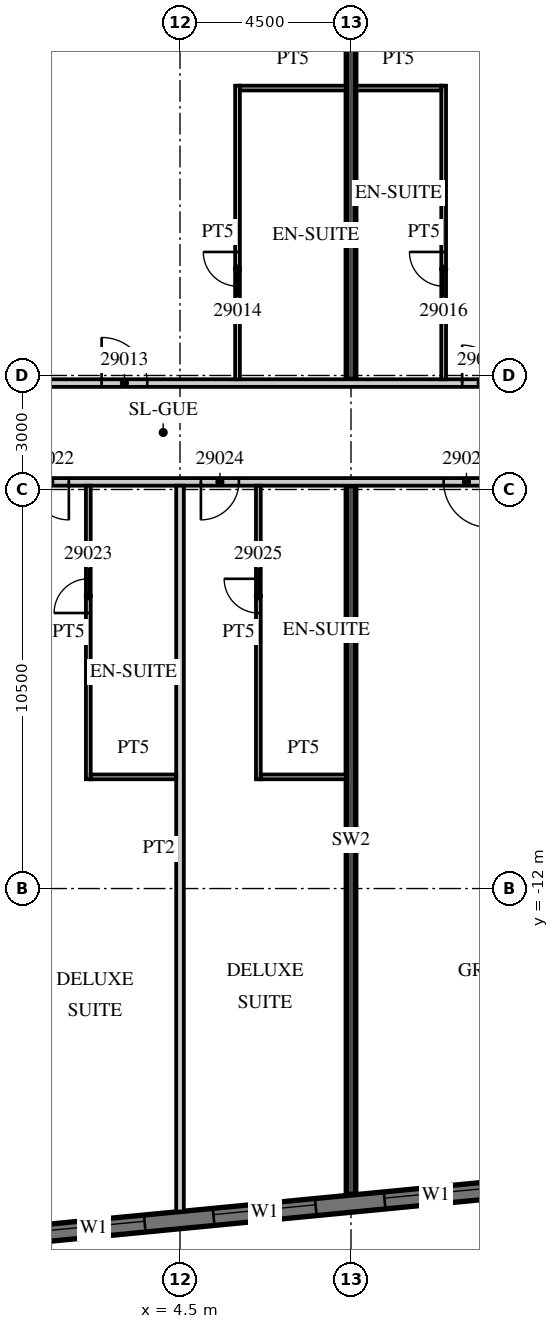
"""IFC4 building model, lengths in metres.
Left out: names, types, materials, properties, quantities, classifications, styles, units other than length and angle.
Written with IfcOpenShell. Run it as: python <this file> out.ifc"""

import sys

from ifc_helpers import new_model, si_unit, direction, frame, frame_2d, origin, place, context, subcontext, project, spatial, rectangle, extrude, element, fill, save


model = new_model("IFC4")
c1 = context("Model", 3, precision=1e-05, world=origin(), true_north=direction((0.0, 1.0)))
c2 = subcontext(c1, "Body", "Model", "MODEL_VIEW")
j1 = project(units=[si_unit("LENGTHUNIT", "METRE"), si_unit("PLANEANGLEUNIT", "RADIAN")], contexts=[c1])
p1 = place(None, origin())
s1 = spatial("IfcSite", under=j1, at=p1, CompositionType="ELEMENT")
p2 = place(p1, origin())
s2 = spatial("IfcBuilding", under=s1, at=p2, CompositionType="ELEMENT")
p3 = place(p2, frame((0.0, 0.0, 130.6)))
s3 = spatial("IfcBuildingStorey", under=s2, at=p3, CompositionType="ELEMENT", Elevation=130.6)
p4 = place(p3, frame((9.0, -20.044, 0.0), z_axis=(0.0, 0.0, 1.0), x_axis=(0.0, 1.0, 0.0)))
e1 = element("IfcWall", 1, at=p4, inside=s3, PredefinedType="SHEAR", context=c2, shape_type="SweptSolid", body=[
    extrude(rectangle(XDim=18.644, YDim=0.25, at=frame_2d((9.322, 0.0))), origin(), (0.0, 0.0, 1.0), 3.3),
])
p5 = place(p3, frame((9.0, 1.4, 0.0), z_axis=(0.0, 0.0, 1.0), x_axis=(0.0, 1.0, 0.0)))
e2 = element("IfcWall", 2, at=p5, inside=s3, PredefinedType="SHEAR", context=c2, shape_type="SweptSolid", body=[
    extrude(rectangle(XDim=20.807, YDim=0.25, at=frame_2d((10.403, 0.0))), origin(), (0.0, 0.0, 1.0), 3.3),
])
p6 = place(p3, frame((-13.521, -22.46, 0.0), z_axis=(0.0, 0.0, 1.0), x_axis=(0.995396096335, 0.095846812164, 0.0)))
e3 = element("IfcWall", 3, at=p6, inside=s3, PredefinedType="SOLIDWALL", context=c2, shape_type="SweptSolid", body=[
    extrude(rectangle(XDim=59.151, YDim=0.45, at=frame_2d((29.575, 0.0))), origin(), (0.0, 0.0, 1.0), 3.02),
])
p7 = place(p6, frame((0.91, 0.0, 0.45)))
e4 = element("IfcOpeningElement", 4, at=p7, cuts=e3, PredefinedType="OPENING", context=c2, shape_type="SweptSolid", body=[
    extrude(rectangle(XDim=2.7, YDim=2.25, at=frame_2d((1.35, 1.125))), frame((0.0, 0.235, 0.0), z_axis=(0.0, -1.0, 0.0), x_axis=(1.0, 0.0, 0.0)), (0.0, 0.0, 1.0), 0.47),
])
p8 = place(p6, frame((5.431, 0.0, 0.45)))
e5 = element("IfcOpeningElement", 5, at=p8, cuts=e3, PredefinedType="OPENING", context=c2, shape_type="SweptSolid", body=[
    extrude(rectangle(XDim=2.7, YDim=2.25, at=frame_2d((1.35, 1.125))), frame((0.0, 0.235, 0.0), z_axis=(0.0, -1.0, 0.0), x_axis=(1.0, 0.0, 0.0)), (0.0, 0.0, 1.0), 0.47),
])
p9 = place(p6, frame((9.952, 0.0, 0.45)))
e6 = element("IfcOpeningElement", 6, at=p9, cuts=e3, PredefinedType="OPENING", context=c2, shape_type="SweptSolid", body=[
    extrude(rectangle(XDim=2.7, YDim=2.25, at=frame_2d((1.35, 1.125))), frame((0.0, 0.235, 0.0), z_axis=(0.0, -1.0, 0.0), x_axis=(1.0, 0.0, 0.0)), (0.0, 0.0, 1.0), 0.47),
])
p10 = place(p6, frame((14.473, 0.0, 0.45)))
e7 = element("IfcOpeningElement", 7, at=p10, cuts=e3, PredefinedType="OPENING", context=c2, shape_type="SweptSolid", body=[
    extrude(rectangle(XDim=2.7, YDim=2.25, at=frame_2d((1.35, 1.125))), frame((0.0, 0.235, 0.0), z_axis=(0.0, -1.0, 0.0), x_axis=(1.0, 0.0, 0.0)), (0.0, 0.0, 1.0), 0.47),
])
p11 = place(p6, frame((18.994, 0.0, 0.45)))
e8 = element("IfcOpeningElement", 8, at=p11, cuts=e3, PredefinedType="OPENING", context=c2, shape_type="SweptSolid", body=[
    extrude(rectangle(XDim=2.7, YDim=2.25, at=frame_2d((1.35, 1.125))), frame((0.0, 0.235, 0.0), z_axis=(0.0, -1.0, 0.0), x_axis=(1.0, 0.0, 0.0)), (0.0, 0.0, 1.0), 0.47),
])
p12 = place(p6, frame((23.514, 0.0, 0.45)))
e9 = element("IfcOpeningElement", 9, at=p12, cuts=e3, PredefinedType="OPENING", context=c2, shape_type="SweptSolid", body=[
    extrude(rectangle(XDim=2.7, YDim=2.25, at=frame_2d((1.35, 1.125))), frame((0.0, 0.235, 0.0), z_axis=(0.0, -1.0, 0.0), x_axis=(1.0, 0.0, 0.0)), (0.0, 0.0, 1.0), 0.47),
])
p13 = place(p6, frame((28.035, 0.0, 0.45)))
e10 = element("IfcOpeningElement", 10, at=p13, cuts=e3, PredefinedType="OPENING", context=c2, shape_type="SweptSolid", body=[
    extrude(rectangle(XDim=2.7, YDim=2.25, at=frame_2d((1.35, 1.125))), frame((0.0, 0.235, 0.0), z_axis=(0.0, -1.0, 0.0), x_axis=(1.0, 0.0, 0.0)), (0.0, 0.0, 1.0), 0.47),
])
p14 = place(p6, frame((32.556, 0.0, 0.45)))
e11 = element("IfcOpeningElement", 11, at=p14, cuts=e3, PredefinedType="OPENING", context=c2, shape_type="SweptSolid", body=[
    extrude(rectangle(XDim=2.7, YDim=2.25, at=frame_2d((1.35, 1.125))), frame((0.0, 0.235, 0.0), z_axis=(0.0, -1.0, 0.0), x_axis=(1.0, 0.0, 0.0)), (0.0, 0.0, 1.0), 0.47),
])
p15 = place(p6, frame((37.077, 0.0, 0.45)))
e12 = element("IfcOpeningElement", 12, at=p15, cuts=e3, PredefinedType="OPENING", context=c2, shape_type="SweptSolid", body=[
    extrude(rectangle(XDim=2.7, YDim=2.25, at=frame_2d((1.35, 1.125))), frame((0.0, 0.235, 0.0), z_axis=(0.0, -1.0, 0.0), x_axis=(1.0, 0.0, 0.0)), (0.0, 0.0, 1.0), 0.47),
])
p16 = place(p6, frame((41.598, 0.0, 0.45)))
e13 = element("IfcOpeningElement", 13, at=p16, cuts=e3, PredefinedType="OPENING", context=c2, shape_type="SweptSolid", body=[
    extrude(rectangle(XDim=2.7, YDim=2.25, at=frame_2d((1.35, 1.125))), frame((0.0, 0.235, 0.0), z_axis=(0.0, -1.0, 0.0), x_axis=(1.0, 0.0, 0.0)), (0.0, 0.0, 1.0), 0.47),
])
p17 = place(p6, frame((46.118, 0.0, 0.45)))
e14 = element("IfcOpeningElement", 14, at=p17, cuts=e3, PredefinedType="OPENING", context=c2, shape_type="SweptSolid", body=[
    extrude(rectangle(XDim=2.7, YDim=2.25, at=frame_2d((1.35, 1.125))), frame((0.0, 0.235, 0.0), z_axis=(0.0, -1.0, 0.0), x_axis=(1.0, 0.0, 0.0)), (0.0, 0.0, 1.0), 0.47),
])
p18 = place(p6, frame((50.639, 0.0, 0.45)))
e15 = element("IfcOpeningElement", 15, at=p18, cuts=e3, PredefinedType="OPENING", context=c2, shape_type="SweptSolid", body=[
    extrude(rectangle(XDim=2.7, YDim=2.25, at=frame_2d((1.35, 1.125))), frame((0.0, 0.235, 0.0), z_axis=(0.0, -1.0, 0.0), x_axis=(1.0, 0.0, 0.0)), (0.0, 0.0, 1.0), 0.47),
])
p19 = place(p6, frame((55.15, 0.0, 0.45)))
e16 = element("IfcOpeningElement", 16, at=p19, cuts=e3, PredefinedType="OPENING", context=c2, shape_type="SweptSolid", body=[
    extrude(rectangle(XDim=2.7, YDim=2.25, at=frame_2d((1.35, 1.125))), frame((0.0, 0.235, 0.0), z_axis=(0.0, -1.0, 0.0), x_axis=(1.0, 0.0, 0.0)), (0.0, 0.0, 1.0), 0.47),
])
p20 = place(p3, frame((-39.316, 1.3, 0.0), z_axis=(0.0, 0.0, 1.0), x_axis=(1.0, 0.0, 0.0)))
e17 = element("IfcWall", 17, at=p20, inside=s3, PredefinedType="PARTITIONING", context=c2, shape_type="SweptSolid", body=[
    extrude(rectangle(XDim=52.816, YDim=0.2, at=frame_2d((26.408, 0.0))), origin(), (0.0, 0.0, 1.0), 3.02),
])
p21 = place(p20, frame((0.15, 0.0, 0.0)))
e18 = element("IfcOpeningElement", 18, at=p21, cuts=e17, PredefinedType="OPENING", context=c2, shape_type="SweptSolid", body=[
    extrude(rectangle(XDim=0.9, YDim=2.1, at=frame_2d((0.45, 1.05))), frame((0.0, 0.11, 0.0), z_axis=(0.0, -1.0, 0.0), x_axis=(1.0, 0.0, 0.0)), (0.0, 0.0, 1.0), 0.22),
])
p22 = place(p20, frame((8.679, 0.0, 0.0)))
e19 = element("IfcOpeningElement", 19, at=p22, cuts=e17, PredefinedType="OPENING", context=c2, shape_type="SweptSolid", body=[
    extrude(rectangle(XDim=1.2, YDim=2.1, at=frame_2d((0.6, 1.05))), frame((0.0, 0.11, 0.0), z_axis=(0.0, -1.0, 0.0), x_axis=(1.0, 0.0, 0.0)), (0.0, 0.0, 1.0), 0.22),
])
p23 = place(p20, frame((14.754, 0.0, 0.0)))
e20 = element("IfcOpeningElement", 20, at=p23, cuts=e17, PredefinedType="OPENING", context=c2, shape_type="SweptSolid", body=[
    extrude(rectangle(XDim=1.2, YDim=2.1, at=frame_2d((0.6, 1.05))), frame((0.0, 0.11, 0.0), z_axis=(0.0, -1.0, 0.0), x_axis=(1.0, 0.0, 0.0)), (0.0, 0.0, 1.0), 0.22),
])
p24 = place(p20, frame((26.678, 0.0, 0.0)))
e21 = element("IfcOpeningElement", 21, at=p24, cuts=e17, PredefinedType="OPENING", context=c2, shape_type="SweptSolid", body=[
    extrude(rectangle(XDim=1.2, YDim=2.1, at=frame_2d((0.6, 1.05))), frame((0.0, 0.11, 0.0), z_axis=(0.0, -1.0, 0.0), x_axis=(1.0, 0.0, 0.0)), (0.0, 0.0, 1.0), 0.22),
])
p25 = place(p20, frame((33.266, 0.0, 0.0)))
e22 = element("IfcOpeningElement", 22, at=p25, cuts=e17, PredefinedType="OPENING", context=c2, shape_type="SweptSolid", body=[
    extrude(rectangle(XDim=1.0, YDim=2.1, at=frame_2d((0.5, 1.05))), frame((0.0, 0.11, 0.0), z_axis=(0.0, -1.0, 0.0), x_axis=(1.0, 0.0, 0.0)), (0.0, 0.0, 1.0), 0.22),
])
p26 = place(p20, frame((37.741, 0.0, 0.0)))
e23 = element("IfcOpeningElement", 23, at=p26, cuts=e17, PredefinedType="OPENING", context=c2, shape_type="SweptSolid", body=[
    extrude(rectangle(XDim=1.0, YDim=2.1, at=frame_2d((0.5, 1.05))), frame((0.0, 0.11, 0.0), z_axis=(0.0, -1.0, 0.0), x_axis=(1.0, 0.0, 0.0)), (0.0, 0.0, 1.0), 0.22),
])
p27 = place(p20, frame((41.754, 0.0, 0.0)))
e24 = element("IfcOpeningElement", 24, at=p27, cuts=e17, PredefinedType="OPENING", context=c2, shape_type="SweptSolid", body=[
    extrude(rectangle(XDim=1.2, YDim=2.1, at=frame_2d((0.6, 1.05))), frame((0.0, 0.11, 0.0), z_axis=(0.0, -1.0, 0.0), x_axis=(1.0, 0.0, 0.0)), (0.0, 0.0, 1.0), 0.22),
])
p28 = place(p20, frame((51.241, 0.0, 0.0)))
e25 = element("IfcOpeningElement", 25, at=p28, cuts=e17, PredefinedType="OPENING", context=c2, shape_type="SweptSolid", body=[
    extrude(rectangle(XDim=1.0, YDim=2.1, at=frame_2d((0.5, 1.05))), frame((0.0, 0.11, 0.0), z_axis=(0.0, -1.0, 0.0), x_axis=(1.0, 0.0, 0.0)), (0.0, 0.0, 1.0), 0.22),
])
p29 = place(p3, frame((6.013, 1.4, 0.0), z_axis=(0.0, 0.0, 1.0), x_axis=(0.0, 1.0, 0.0)))
e26 = element("IfcWall", 26, at=p29, inside=s3, PredefinedType="PARTITIONING", context=c2, shape_type="SweptSolid", body=[
    extrude(rectangle(XDim=7.725, YDim=0.125, at=frame_2d((3.863, 0.0))), origin(), (0.0, 0.0, 1.0), 3.02),
])
p30 = place(p29, frame((2.45, 0.0, 0.0)))
e27 = element("IfcOpeningElement", 27, at=p30, cuts=e26, PredefinedType="OPENING", context=c2, shape_type="SweptSolid", body=[
    extrude(rectangle(XDim=0.9, YDim=2.1, at=frame_2d((0.45, 1.05))), frame((0.0, 0.073, 0.0), z_axis=(0.0, -1.0, 0.0), x_axis=(1.0, 0.0, 0.0)), (0.0, 0.0, 1.0), 0.145),
])
p31 = place(p3, frame((6.075, 9.062, 0.0), z_axis=(0.0, 0.0, 1.0), x_axis=(1.0, 0.0, 0.0)))
e28 = element("IfcWall", 28, at=p31, inside=s3, PredefinedType="PARTITIONING", context=c2, shape_type="SweptSolid", body=[
    extrude(rectangle(XDim=2.8, YDim=0.125, at=frame_2d((1.4, 0.0))), origin(), (0.0, 0.0, 1.0), 3.02),
])
p32 = place(p3, frame((11.438, 1.4, 0.0), z_axis=(0.0, 0.0, 1.0), x_axis=(0.0, 1.0, 0.0)))
e29 = element("IfcWall", 29, at=p32, inside=s3, PredefinedType="PARTITIONING", context=c2, shape_type="SweptSolid", body=[
    extrude(rectangle(XDim=7.725, YDim=0.125, at=frame_2d((3.863, 0.0))), origin(), (0.0, 0.0, 1.0), 3.02),
])
p33 = place(p32, frame((2.45, 0.0, 0.0)))
e30 = element("IfcOpeningElement", 30, at=p33, cuts=e29, PredefinedType="OPENING", context=c2, shape_type="SweptSolid", body=[
    extrude(rectangle(XDim=0.9, YDim=2.1, at=frame_2d((0.45, 1.05))), frame((0.0, 0.073, 0.0), z_axis=(0.0, -1.0, 0.0), x_axis=(1.0, 0.0, 0.0)), (0.0, 0.0, 1.0), 0.145),
])
p34 = place(p3, frame((9.125, 9.062, 0.0), z_axis=(0.0, 0.0, 1.0), x_axis=(1.0, 0.0, 0.0)))
e31 = element("IfcWall", 31, at=p34, inside=s3, PredefinedType="PARTITIONING", context=c2, shape_type="SweptSolid", body=[
    extrude(rectangle(XDim=2.25, YDim=0.125, at=frame_2d((1.125, 0.0))), origin(), (0.0, 0.0, 1.0), 3.02),
])
p35 = place(p3, frame((-13.5, -1.3, 0.0), z_axis=(0.0, 0.0, 1.0), x_axis=(1.0, 0.0, 0.0)))
e32 = element("IfcWall", 32, at=p35, inside=s3, PredefinedType="PARTITIONING", context=c2, shape_type="SweptSolid", body=[
    extrude(rectangle(XDim=60.932, YDim=0.2, at=frame_2d((30.466, 0.0))), origin(), (0.0, 0.0, 1.0), 3.02),
])
p36 = place(p35, frame((2.925, 0.0, 0.0)))
e33 = element("IfcOpeningElement", 33, at=p36, cuts=e32, PredefinedType="OPENING", context=c2, shape_type="SweptSolid", body=[
    extrude(rectangle(XDim=1.0, YDim=2.1, at=frame_2d((0.5, 1.05))), frame((0.0, 0.11, 0.0), z_axis=(0.0, -1.0, 0.0), x_axis=(1.0, 0.0, 0.0)), (0.0, 0.0, 1.0), 0.22),
])
p37 = place(p35, frame((9.863, 0.0, 0.0)))
e34 = element("IfcOpeningElement", 34, at=p37, cuts=e32, PredefinedType="OPENING", context=c2, shape_type="SweptSolid", body=[
    extrude(rectangle(XDim=1.2, YDim=2.1, at=frame_2d((0.6, 1.05))), frame((0.0, 0.11, 0.0), z_axis=(0.0, -1.0, 0.0), x_axis=(1.0, 0.0, 0.0)), (0.0, 0.0, 1.0), 0.22),
])
p38 = place(p35, frame((14.075, 0.0, 0.0)))
e35 = element("IfcOpeningElement", 35, at=p38, cuts=e32, PredefinedType="OPENING", context=c2, shape_type="SweptSolid", body=[
    extrude(rectangle(XDim=1.0, YDim=2.1, at=frame_2d((0.5, 1.05))), frame((0.0, 0.11, 0.0), z_axis=(0.0, -1.0, 0.0), x_axis=(1.0, 0.0, 0.0)), (0.0, 0.0, 1.0), 0.22),
])
p39 = place(p35, frame((18.55, 0.0, 0.0)))
e36 = element("IfcOpeningElement", 36, at=p39, cuts=e32, PredefinedType="OPENING", context=c2, shape_type="SweptSolid", body=[
    extrude(rectangle(XDim=1.0, YDim=2.1, at=frame_2d((0.5, 1.05))), frame((0.0, 0.11, 0.0), z_axis=(0.0, -1.0, 0.0), x_axis=(1.0, 0.0, 0.0)), (0.0, 0.0, 1.0), 0.22),
])
p40 = place(p35, frame((24.938, 0.0, 0.0)))
e37 = element("IfcOpeningElement", 37, at=p40, cuts=e32, PredefinedType="OPENING", context=c2, shape_type="SweptSolid", body=[
    extrude(rectangle(XDim=1.2, YDim=2.1, at=frame_2d((0.6, 1.05))), frame((0.0, 0.11, 0.0), z_axis=(0.0, -1.0, 0.0), x_axis=(1.0, 0.0, 0.0)), (0.0, 0.0, 1.0), 0.22),
])
p41 = place(p35, frame((36.862, 0.0, 0.0)))
e38 = element("IfcOpeningElement", 38, at=p41, cuts=e32, PredefinedType="OPENING", context=c2, shape_type="SweptSolid", body=[
    extrude(rectangle(XDim=1.2, YDim=2.1, at=frame_2d((0.6, 1.05))), frame((0.0, 0.11, 0.0), z_axis=(0.0, -1.0, 0.0), x_axis=(1.0, 0.0, 0.0)), (0.0, 0.0, 1.0), 0.22),
])
p42 = place(p35, frame((41.075, 0.0, 0.0)))
e39 = element("IfcOpeningElement", 39, at=p42, cuts=e32, PredefinedType="OPENING", context=c2, shape_type="SweptSolid", body=[
    extrude(rectangle(XDim=1.0, YDim=2.1, at=frame_2d((0.5, 1.05))), frame((0.0, 0.11, 0.0), z_axis=(0.0, -1.0, 0.0), x_axis=(1.0, 0.0, 0.0)), (0.0, 0.0, 1.0), 0.22),
])
p43 = place(p35, frame((45.55, 0.0, 0.0)))
e40 = element("IfcOpeningElement", 40, at=p43, cuts=e32, PredefinedType="OPENING", context=c2, shape_type="SweptSolid", body=[
    extrude(rectangle(XDim=1.0, YDim=2.1, at=frame_2d((0.5, 1.05))), frame((0.0, 0.11, 0.0), z_axis=(0.0, -1.0, 0.0), x_axis=(1.0, 0.0, 0.0)), (0.0, 0.0, 1.0), 0.22),
])
p44 = place(p35, frame((52.425, 0.0, 0.0)))
e41 = element("IfcOpeningElement", 41, at=p44, cuts=e32, PredefinedType="OPENING", context=c2, shape_type="SweptSolid", body=[
    extrude(rectangle(XDim=1.0, YDim=2.1, at=frame_2d((0.5, 1.05))), frame((0.0, 0.11, 0.0), z_axis=(0.0, -1.0, 0.0), x_axis=(1.0, 0.0, 0.0)), (0.0, 0.0, 1.0), 0.22),
])
p45 = place(p35, frame((56.95, 0.0, 0.0)))
e42 = element("IfcOpeningElement", 42, at=p45, cuts=e32, PredefinedType="OPENING", context=c2, shape_type="SweptSolid", body=[
    extrude(rectangle(XDim=1.0, YDim=2.1, at=frame_2d((0.5, 1.05))), frame((0.0, 0.11, 0.0), z_axis=(0.0, -1.0, 0.0), x_axis=(1.0, 0.0, 0.0)), (0.0, 0.0, 1.0), 0.22),
])
p46 = place(p35, frame((59.882, 0.0, 0.0)))
e43 = element("IfcOpeningElement", 43, at=p46, cuts=e32, PredefinedType="OPENING", context=c2, shape_type="SweptSolid", body=[
    extrude(rectangle(XDim=0.9, YDim=2.1, at=frame_2d((0.45, 1.05))), frame((0.0, 0.11, 0.0), z_axis=(0.0, -1.0, 0.0), x_axis=(1.0, 0.0, 0.0)), (0.0, 0.0, 1.0), 0.22),
])
p47 = place(p3, frame((4.5, -20.499, 0.0), z_axis=(0.0, 0.0, 1.0), x_axis=(0.0, 1.0, 0.0)))
e44 = element("IfcWall", 44, at=p47, inside=s3, PredefinedType="PARTITIONING", context=c2, shape_type="SweptSolid", body=[
    extrude(rectangle(XDim=19.099, YDim=0.2, at=frame_2d((9.55, 0.0))), origin(), (0.0, 0.0, 1.0), 3.02),
])
p48 = place(p3, frame((2.087, -9.125, 0.0), z_axis=(0.0, 0.0, 1.0), x_axis=(0.0, 1.0, 0.0)))
e45 = element("IfcWall", 45, at=p48, inside=s3, PredefinedType="PARTITIONING", context=c2, shape_type="SweptSolid", body=[
    extrude(rectangle(XDim=7.725, YDim=0.125, at=frame_2d((3.863, 0.0))), origin(), (0.0, 0.0, 1.0), 3.02),
])
p49 = place(p48, frame((4.375, 0.0, 0.0)))
e46 = element("IfcOpeningElement", 46, at=p49, cuts=e45, PredefinedType="OPENING", context=c2, shape_type="SweptSolid", body=[
    extrude(rectangle(XDim=0.9, YDim=2.1, at=frame_2d((0.45, 1.05))), frame((0.0, 0.073, 0.0), z_axis=(0.0, -1.0, 0.0), x_axis=(1.0, 0.0, 0.0)), (0.0, 0.0, 1.0), 0.145),
])
p50 = place(p3, frame((2.15, -9.062, 0.0), z_axis=(0.0, 0.0, 1.0), x_axis=(1.0, 0.0, 0.0)))
e47 = element("IfcWall", 47, at=p50, inside=s3, PredefinedType="PARTITIONING", context=c2, shape_type="SweptSolid", body=[
    extrude(rectangle(XDim=2.25, YDim=0.125, at=frame_2d((1.125, 0.0))), origin(), (0.0, 0.0, 1.0), 3.02),
])
p51 = place(p3, frame((6.562, -9.125, 0.0), z_axis=(0.0, 0.0, 1.0), x_axis=(0.0, 1.0, 0.0)))
e48 = element("IfcWall", 48, at=p51, inside=s3, PredefinedType="PARTITIONING", context=c2, shape_type="SweptSolid", body=[
    extrude(rectangle(XDim=7.725, YDim=0.125, at=frame_2d((3.863, 0.0))), origin(), (0.0, 0.0, 1.0), 3.02),
])
p52 = place(p51, frame((4.375, 0.0, 0.0)))
e49 = element("IfcOpeningElement", 49, at=p52, cuts=e48, PredefinedType="OPENING", context=c2, shape_type="SweptSolid", body=[
    extrude(rectangle(XDim=0.9, YDim=2.1, at=frame_2d((0.45, 1.05))), frame((0.0, 0.073, 0.0), z_axis=(0.0, -1.0, 0.0), x_axis=(1.0, 0.0, 0.0)), (0.0, 0.0, 1.0), 0.145),
])
p53 = place(p3, frame((6.625, -9.062, 0.0), z_axis=(0.0, 0.0, 1.0), x_axis=(1.0, 0.0, 0.0)))
e50 = element("IfcWall", 50, at=p53, inside=s3, PredefinedType="PARTITIONING", context=c2, shape_type="SweptSolid", body=[
    extrude(rectangle(XDim=2.25, YDim=0.125, at=frame_2d((1.125, 0.0))), origin(), (0.0, 0.0, 1.0), 3.02),
])
p54 = place(p10, origin())
e51 = element("IfcWindow", 51, at=p54, inside=s3, PartitioningType="SINGLE_PANEL", PredefinedType="WINDOW", context=c2, shape_type="SweptSolid", body=[
    extrude(rectangle(XDim=2.7, YDim=2.25, at=frame_2d((1.35, 1.125))), frame((0.0, 0.09, 0.0), z_axis=(0.0, -1.0, 0.0), x_axis=(1.0, 0.0, 0.0)), (0.0, 0.0, 1.0), 0.06),
])
fill(e7, e51)
p55 = place(p11, origin())
e52 = element("IfcWindow", 52, at=p55, inside=s3, PartitioningType="SINGLE_PANEL", PredefinedType="WINDOW", context=c2, shape_type="SweptSolid", body=[
    extrude(rectangle(XDim=2.7, YDim=2.25, at=frame_2d((1.35, 1.125))), frame((0.0, 0.09, 0.0), z_axis=(0.0, -1.0, 0.0), x_axis=(1.0, 0.0, 0.0)), (0.0, 0.0, 1.0), 0.06),
])
fill(e8, e52)
p56 = place(p12, origin())
e53 = element("IfcWindow", 53, at=p56, inside=s3, PartitioningType="SINGLE_PANEL", PredefinedType="WINDOW", context=c2, shape_type="SweptSolid", body=[
    extrude(rectangle(XDim=2.7, YDim=2.25, at=frame_2d((1.35, 1.125))), frame((0.0, 0.09, 0.0), z_axis=(0.0, -1.0, 0.0), x_axis=(1.0, 0.0, 0.0)), (0.0, 0.0, 1.0), 0.06),
])
fill(e9, e53)
p57 = place(p27, origin())
e54 = element("IfcDoor", 54, at=p57, inside=s3, OperationType="SINGLE_SWING_LEFT", PredefinedType="DOOR", context=c2, shape_type="SweptSolid", body=[
    extrude(rectangle(XDim=1.2, YDim=2.1, at=frame_2d((0.6, 1.05))), frame((0.0, 0.025, 0.0), z_axis=(0.0, -1.0, 0.0), x_axis=(1.0, 0.0, 0.0)), (0.0, 0.0, 1.0), 0.05),
])
fill(e24, e54)
p58 = place(p30, origin())
e55 = element("IfcDoor", 55, at=p58, inside=s3, OperationType="SINGLE_SWING_RIGHT", PredefinedType="DOOR", context=c2, shape_type="SweptSolid", body=[
    extrude(rectangle(XDim=0.9, YDim=2.1, at=frame_2d((0.45, 1.05))), frame((0.0, 0.025, 0.0), z_axis=(0.0, -1.0, 0.0), x_axis=(1.0, 0.0, 0.0)), (0.0, 0.0, 1.0), 0.05),
])
fill(e27, e55)
p59 = place(p28, origin())
e56 = element("IfcDoor", 56, at=p59, inside=s3, OperationType="SINGLE_SWING_LEFT", PredefinedType="DOOR", context=c2, shape_type="SweptSolid", body=[
    extrude(rectangle(XDim=1.0, YDim=2.1, at=frame_2d((0.5, 1.05))), frame((0.0, 0.025, 0.0), z_axis=(0.0, -1.0, 0.0), x_axis=(1.0, 0.0, 0.0)), (0.0, 0.0, 1.0), 0.05),
])
fill(e25, e56)
p60 = place(p33, origin())
e57 = element("IfcDoor", 57, at=p60, inside=s3, OperationType="SINGLE_SWING_RIGHT", PredefinedType="DOOR", context=c2, shape_type="SweptSolid", body=[
    extrude(rectangle(XDim=0.9, YDim=2.1, at=frame_2d((0.45, 1.05))), frame((0.0, 0.025, 0.0), z_axis=(0.0, -1.0, 0.0), x_axis=(1.0, 0.0, 0.0)), (0.0, 0.0, 1.0), 0.05),
])
fill(e30, e57)
p61 = place(p38, origin())
e58 = element("IfcDoor", 58, at=p61, inside=s3, OperationType="SINGLE_SWING_RIGHT", PredefinedType="DOOR", context=c2, shape_type="SweptSolid", body=[
    extrude(rectangle(XDim=1.0, YDim=2.1, at=frame_2d((0.5, 1.05))), frame((0.0, 0.025, 0.0), z_axis=(0.0, -1.0, 0.0), x_axis=(1.0, 0.0, 0.0)), (0.0, 0.0, 1.0), 0.05),
])
fill(e35, e58)
p62 = place(p49, origin())
e59 = element("IfcDoor", 59, at=p62, inside=s3, OperationType="SINGLE_SWING_LEFT", PredefinedType="DOOR", context=c2, shape_type="SweptSolid", body=[
    extrude(rectangle(XDim=0.9, YDim=2.1, at=frame_2d((0.45, 1.05))), frame((0.0, 0.025, 0.0), z_axis=(0.0, -1.0, 0.0), x_axis=(1.0, 0.0, 0.0)), (0.0, 0.0, 1.0), 0.05),
])
fill(e46, e59)
p63 = place(p39, origin())
e60 = element("IfcDoor", 60, at=p63, inside=s3, OperationType="SINGLE_SWING_LEFT", PredefinedType="DOOR", context=c2, shape_type="SweptSolid", body=[
    extrude(rectangle(XDim=1.0, YDim=2.1, at=frame_2d((0.5, 1.05))), frame((0.0, 0.025, 0.0), z_axis=(0.0, -1.0, 0.0), x_axis=(1.0, 0.0, 0.0)), (0.0, 0.0, 1.0), 0.05),
])
fill(e36, e60)
p64 = place(p52, origin())
e61 = element("IfcDoor", 61, at=p64, inside=s3, OperationType="SINGLE_SWING_RIGHT", PredefinedType="DOOR", context=c2, shape_type="SweptSolid", body=[
    extrude(rectangle(XDim=0.9, YDim=2.1, at=frame_2d((0.45, 1.05))), frame((0.0, 0.025, 0.0), z_axis=(0.0, -1.0, 0.0), x_axis=(1.0, 0.0, 0.0)), (0.0, 0.0, 1.0), 0.05),
])
fill(e49, e61)
p65 = place(p40, origin())
e62 = element("IfcDoor", 62, at=p65, inside=s3, OperationType="SINGLE_SWING_RIGHT", PredefinedType="DOOR", context=c2, shape_type="SweptSolid", body=[
    extrude(rectangle(XDim=1.2, YDim=2.1, at=frame_2d((0.6, 1.05))), frame((0.0, 0.025, 0.0), z_axis=(0.0, -1.0, 0.0), x_axis=(1.0, 0.0, 0.0)), (0.0, 0.0, 1.0), 0.05),
])
fill(e37, e62)
save(model, sys.argv[1])
